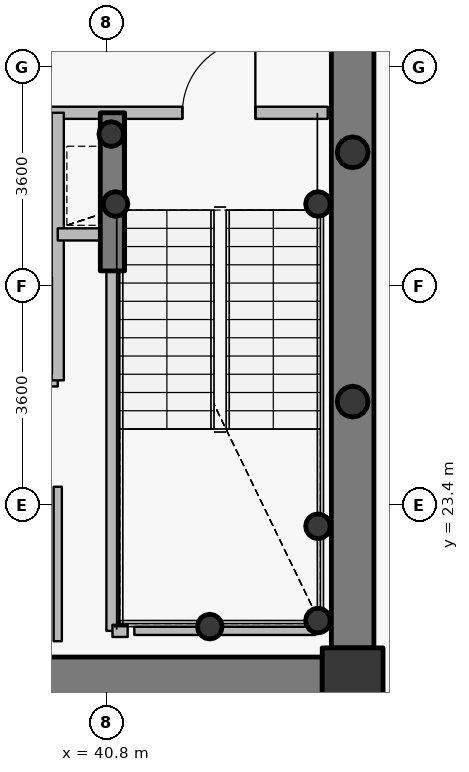
"""IFC4 building model, lengths in metres.
Left out: names, types, materials, properties, quantities, classifications, styles, units other than length and angle.
Written with IfcOpenShell. Run it as: python <this file> out.ifc"""

import sys

from ifc_helpers import new_model, si_unit, direction, frame, frame_2d, origin, origin_2d, place, context, subcontext, project, spatial, rectangle, hollow_circle, extrude, source, transform, mapped, element, fill, save


model = new_model("IFC4")
c1 = context("Model", 3, precision=1e-05, world=origin(), true_north=direction((0.0, 1.0)))
c2 = subcontext(c1, "Body", "Model", "MODEL_VIEW")
j1 = project(units=[si_unit("LENGTHUNIT", "METRE"), si_unit("PLANEANGLEUNIT", "RADIAN")], contexts=[c1])
p1 = place(None, origin())
s1 = spatial("IfcSite", under=j1, at=p1, CompositionType="ELEMENT")
p2 = place(p1, origin())
s2 = spatial("IfcBuilding", under=s1, at=p2, CompositionType="ELEMENT")
p3 = place(p2, frame((0.0, 0.0, 295.5)))
s3 = spatial("IfcBuildingStorey", under=s2, at=p3, CompositionType="ELEMENT", Elevation=295.5)
p4 = place(p3, frame((44.85, 20.55, 0.0), z_axis=(0.0, 0.0, 1.0), x_axis=(1.0, 0.0, 0.0)))
e1 = element("IfcColumn", 1, at=p4, inside=s3, PredefinedType="COLUMN", context=c2, shape_type="SweptSolid", body=[
    extrude(rectangle(XDim=1.0, YDim=1.0, at=origin_2d()), origin(), (0.0, 0.0, 1.0), 3.75),
])
for number, where, z_axis, x_axis in (
    (2, (44.28, 21.5, 0.0), (0.0, 0.0, 1.0), (1.0, 0.0, 0.0)),
    (3, (44.28, 23.05, 0.0), (0.0, 0.0, 1.0), (1.0, 0.0, 0.0)),
    (4, (42.5, 21.4, 0.0), (0.0, 0.0, 1.0), (1.0, 0.0, 0.0)),
    (5, (40.95, 28.35, 0.0), (0.0, 0.0, 1.0), (1.0, 0.0, 0.0)),
    (6, (44.28, 28.35, 0.0), (0.0, 0.0, 1.0), (1.0, 0.0, 0.0)),
    (7, (40.88, 29.5, 0.0), (0.0, 0.0, 1.0), (1.0, 0.0, 0.0)),
):
    element("IfcColumn", number, at=place(p3, frame(where, z_axis=z_axis, x_axis=x_axis)), inside=s3, PredefinedType="COLUMN", context=c2, shape_type="SweptSolid", body=[
        extrude(hollow_circle(Radius=0.203, WallThickness=0.016, at=origin_2d()), origin(), (0.0, 0.0, 1.0), 3.75),
    ])
p5 = place(p3, frame((44.85, 32.95, 0.0), z_axis=(0.0, 0.0, 1.0), x_axis=(0.0, -1.0, 0.0)))
e8 = element("IfcWall", 8, at=p5, inside=s3, PredefinedType="SHEAR", context=c2, shape_type="SweptSolid", body=[
    extrude(rectangle(XDim=11.9, YDim=0.7, at=frame_2d((5.95, 0.0))), origin(), (0.0, 0.0, 1.0), 3.05),
])
p6 = place(p3, frame((44.35, 20.55, 0.0), z_axis=(0.0, 0.0, 1.0), x_axis=(-1.0, 0.0, 0.0)))
e9 = element("IfcWall", 9, at=p6, inside=s3, PredefinedType="SHEAR", context=c2, shape_type="SweptSolid", body=[
    extrude(rectangle(XDim=16.7, YDim=0.7, at=frame_2d((8.35, 0.0))), origin(), (0.0, 0.0, 1.0), 3.05),
])
p7 = place(p6, frame((12.925, 0.0, 0.0)))
e10 = element("IfcOpeningElement", 10, at=p7, cuts=e9, PredefinedType="OPENING", context=c2, shape_type="SweptSolid", body=[
    extrude(rectangle(XDim=1.15, YDim=2.15, at=origin_2d()), frame((0.575, 0.36, 1.075), z_axis=(0.0, -1.0, 0.0), x_axis=(1.0, 0.0, 0.0)), (0.0, 0.0, 1.0), 0.72),
])
p8 = place(p6, frame((9.1, 0.0, 0.0)))
e11 = element("IfcOpeningElement", 11, at=p8, cuts=e9, PredefinedType="OPENING", context=c2, shape_type="SweptSolid", body=[
    extrude(rectangle(XDim=1.15, YDim=2.15, at=origin_2d()), frame((0.575, 0.36, 1.075), z_axis=(0.0, -1.0, 0.0), x_axis=(1.0, 0.0, 0.0)), (0.0, 0.0, 1.0), 0.72),
])
p9 = place(p3, frame((40.9, 27.25, 0.0), z_axis=(0.0, 0.0, 1.0), x_axis=(0.0, 1.0, 0.0)))
e12 = element("IfcWall", 12, at=p9, inside=s3, PredefinedType="SHEAR", context=c2, shape_type="SweptSolid", body=[
    extrude(rectangle(XDim=2.6, YDim=0.4, at=frame_2d((1.3, 0.0))), origin(), (0.0, 0.0, 1.0), 3.1),
])
for number, where, z_axis, x_axis in (
    (13, (44.85, 25.1, 0.0), (0.0, 0.0, 1.0), (1.0, 0.0, 0.0)),
    (14, (44.85, 29.2, 0.0), (0.0, 0.0, 1.0), (1.0, 0.0, 0.0)),
):
    element("IfcColumn", number, at=place(p3, frame(where, z_axis=z_axis, x_axis=x_axis)), inside=s3, PredefinedType="COLUMN", context=c2, shape_type="SweptSolid", body=[
        extrude(hollow_circle(Radius=0.254, WallThickness=0.02, at=origin_2d()), origin(), (0.0, 0.0, 1.0), 3.75),
    ])
p10 = place(p3, frame((35.05, 27.25, 0.0), z_axis=(0.0, 0.0, 1.0), x_axis=(1.0, 0.0, 0.0)))
e15 = element("IfcWall", 15, at=p10, inside=s3, PredefinedType="PARTITIONING", context=c2, shape_type="SweptSolid", body=[
    extrude(rectangle(XDim=4.95, YDim=0.2, at=frame_2d((2.475, 0.0))), origin(), (0.0, 0.0, 1.0), 3.085),
])
p11 = place(p3, frame((35.45, 25.45, 0.0), z_axis=(0.0, 0.0, 1.0), x_axis=(1.0, 0.0, 0.0)))
e16 = element("IfcWall", 16, at=p11, inside=s3, PredefinedType="PARTITIONING", context=c2, shape_type="SweptSolid", body=[
    extrude(rectangle(XDim=4.55, YDim=0.2, at=frame_2d((2.275, 0.0))), origin(), (0.0, 0.0, 1.0), 3.085),
])
p12 = place(p11, frame((0.25, 0.0, 0.0)))
e17 = element("IfcOpeningElement", 17, at=p12, cuts=e16, PredefinedType="OPENING", context=c2, shape_type="SweptSolid", body=[
    extrude(rectangle(XDim=1.05, YDim=2.15, at=origin_2d()), frame((0.525, 0.11, 1.075), z_axis=(0.0, -1.0, 0.0), x_axis=(1.0, 0.0, 0.0)), (0.0, 0.0, 1.0), 0.22),
])
p13 = place(p11, frame((1.745, 0.0, 0.0)))
e18 = element("IfcOpeningElement", 18, at=p13, cuts=e16, PredefinedType="OPENING", context=c2, shape_type="SweptSolid", body=[
    extrude(rectangle(XDim=1.05, YDim=2.15, at=origin_2d()), frame((0.525, 0.11, 1.075), z_axis=(0.0, -1.0, 0.0), x_axis=(1.0, 0.0, 0.0)), (0.0, 0.0, 1.0), 0.22),
])
p14 = place(p11, frame((3.165, 0.0, 0.0)))
e19 = element("IfcOpeningElement", 19, at=p14, cuts=e16, PredefinedType="OPENING", context=c2, shape_type="SweptSolid", body=[
    extrude(rectangle(XDim=1.05, YDim=2.15, at=origin_2d()), frame((0.525, 0.11, 1.075), z_axis=(0.0, -1.0, 0.0), x_axis=(1.0, 0.0, 0.0)), (0.0, 0.0, 1.0), 0.22),
])
p15 = place(p3, frame((35.95, 29.85, 0.0), z_axis=(0.0, 0.0, 1.0), x_axis=(1.0, 0.0, 0.0)))
e20 = element("IfcWall", 20, at=p15, inside=s3, PredefinedType="PARTITIONING", context=c2, shape_type="SweptSolid", body=[
    extrude(rectangle(XDim=8.49, YDim=0.2, at=frame_2d((4.245, 0.0))), origin(), (0.0, 0.0, 1.0), 3.085),
])
p16 = place(p15, frame((6.1, 0.0, 0.0)))
e21 = element("IfcOpeningElement", 21, at=p16, cuts=e20, PredefinedType="OPENING", context=c2, shape_type="SweptSolid", body=[
    extrude(rectangle(XDim=1.2, YDim=2.15, at=origin_2d()), frame((0.6, 0.11, 1.075), z_axis=(0.0, -1.0, 0.0), x_axis=(1.0, 0.0, 0.0)), (0.0, 0.0, 1.0), 0.22),
])
p17 = place(p15, frame((0.37, 0.0, 0.0)))
e22 = element("IfcOpeningElement", 22, at=p17, cuts=e20, PredefinedType="OPENING", context=c2, shape_type="SweptSolid", body=[
    extrude(rectangle(XDim=1.15, YDim=2.15, at=origin_2d()), frame((0.575, 0.11, 1.075), z_axis=(0.0, -1.0, 0.0), x_axis=(1.0, 0.0, 0.0)), (0.0, 0.0, 1.0), 0.22),
])
p18 = place(p15, frame((2.425, 0.0, 0.0)))
e23 = element("IfcOpeningElement", 23, at=p18, cuts=e20, PredefinedType="OPENING", context=c2, shape_type="SweptSolid", body=[
    extrude(rectangle(XDim=1.05, YDim=2.15, at=origin_2d()), frame((0.525, 0.11, 1.075), z_axis=(0.0, -1.0, 0.0), x_axis=(1.0, 0.0, 0.0)), (0.0, 0.0, 1.0), 0.22),
])
p19 = place(p3, frame((40.0, 25.45, 0.0), z_axis=(0.0, 0.0, 1.0), x_axis=(0.0, 1.0, 0.0)))
e24 = element("IfcWall", 24, at=p19, inside=s3, PredefinedType="PARTITIONING", context=c2, shape_type="SweptSolid", body=[
    extrude(rectangle(XDim=4.4, YDim=0.2, at=frame_2d((2.2, 0.0))), origin(), (0.0, 0.0, 1.0), 3.5),
])
p20 = place(p3, frame((40.0, 27.85, 0.0), z_axis=(0.0, 0.0, 1.0), x_axis=(1.0, 0.0, 0.0)))
e25 = element("IfcWall", 25, at=p20, inside=s3, PredefinedType="PARTITIONING", context=c2, shape_type="SweptSolid", body=[
    extrude(rectangle(XDim=0.9, YDim=0.2, at=frame_2d((0.45, 0.0))), origin(), (0.0, 0.0, 1.0), 3.5),
])
p21 = place(p3, frame((40.9, 21.33, 0.0), z_axis=(0.0, 0.0, 1.0), x_axis=(0.0, 1.0, 0.0)))
e26 = element("IfcWall", 26, at=p21, inside=s3, PredefinedType="PARTITIONING", context=c2, shape_type="SweptSolid", body=[
    extrude(rectangle(XDim=5.91, YDim=0.2, at=frame_2d((2.955, 0.0))), origin(), (0.0, 0.0, 1.0), 3.035),
])
p22 = place(p3, frame((40.9, 21.33, 0.0), z_axis=(0.0, 0.0, 1.0), x_axis=(1.0, 0.0, 0.0)))
e27 = element("IfcWall", 27, at=p22, inside=s3, PredefinedType="PARTITIONING", context=c2, shape_type="SweptSolid", body=[
    extrude(rectangle(XDim=0.25, YDim=0.2, at=frame_2d((0.125, 0.0))), origin(), (0.0, 0.0, 1.0), 3.035),
])
p23 = place(p3, frame((44.24, 21.33, 0.0), z_axis=(0.0, 0.0, 1.0), x_axis=(-1.0, 0.0, 0.0)))
e28 = element("IfcWall", 28, at=p23, inside=s3, PredefinedType="PARTITIONING", context=c2, shape_type="SweptSolid", body=[
    extrude(rectangle(XDim=2.98, YDim=0.135, at=frame_2d((1.49, 0.0))), origin(), (0.0, 0.0, 1.0), 3.035),
])
p24 = place(p3, frame((40.0, 23.7, 0.0), z_axis=(0.0, 0.0, 1.0), x_axis=(0.0, -1.0, 0.0)))
e29 = element("IfcWall", 29, at=p24, inside=s3, PredefinedType="PARTITIONING", context=c2, shape_type="SweptSolid", body=[
    extrude(rectangle(XDim=2.54, YDim=0.135, at=frame_2d((1.27, 0.0))), origin(), (0.0, 0.0, 1.0), 3.035),
])
p25 = place(p3, frame((45.2, 20.508, 0.0), z_axis=(0.0, 0.0, 1.0), x_axis=(0.0, 1.0, 0.0)))
e30 = element("IfcWall", 30, at=p25, inside=s3, PredefinedType="PARTITIONING", context=c2, shape_type="SweptSolid", body=[
    extrude(rectangle(XDim=0.532, YDim=0.135, at=frame_2d((0.266, 0.0))), origin(), (0.0, 0.0, 1.0), 3.5),
])
m1 = source(origin(), c2, "Body", "SweptSolid", [
    extrude(rectangle(XDim=1.2, YDim=2.15, at=origin_2d()), frame((0.6, 0.025, 1.075), z_axis=(0.0, -1.0, 0.0), x_axis=(1.0, 0.0, 0.0)), (0.0, 0.0, 1.0), 0.05),
])
p26 = place(p16, origin())
e31 = element("IfcDoor", 31, at=p26, inside=s3, OperationType="SINGLE_SWING_RIGHT", PredefinedType="DOOR", context=c2, shape_type="MappedRepresentation", body=[
    mapped(m1, transform((0.0, 0.0, 0.0), x_axis=(1.0, 0.0, 0.0), y_axis=(0.0, 1.0, 0.0), z_axis=(0.0, 0.0, 1.0), scale=1.0)),
])
fill(e21, e31)
save(model, sys.argv[1])
